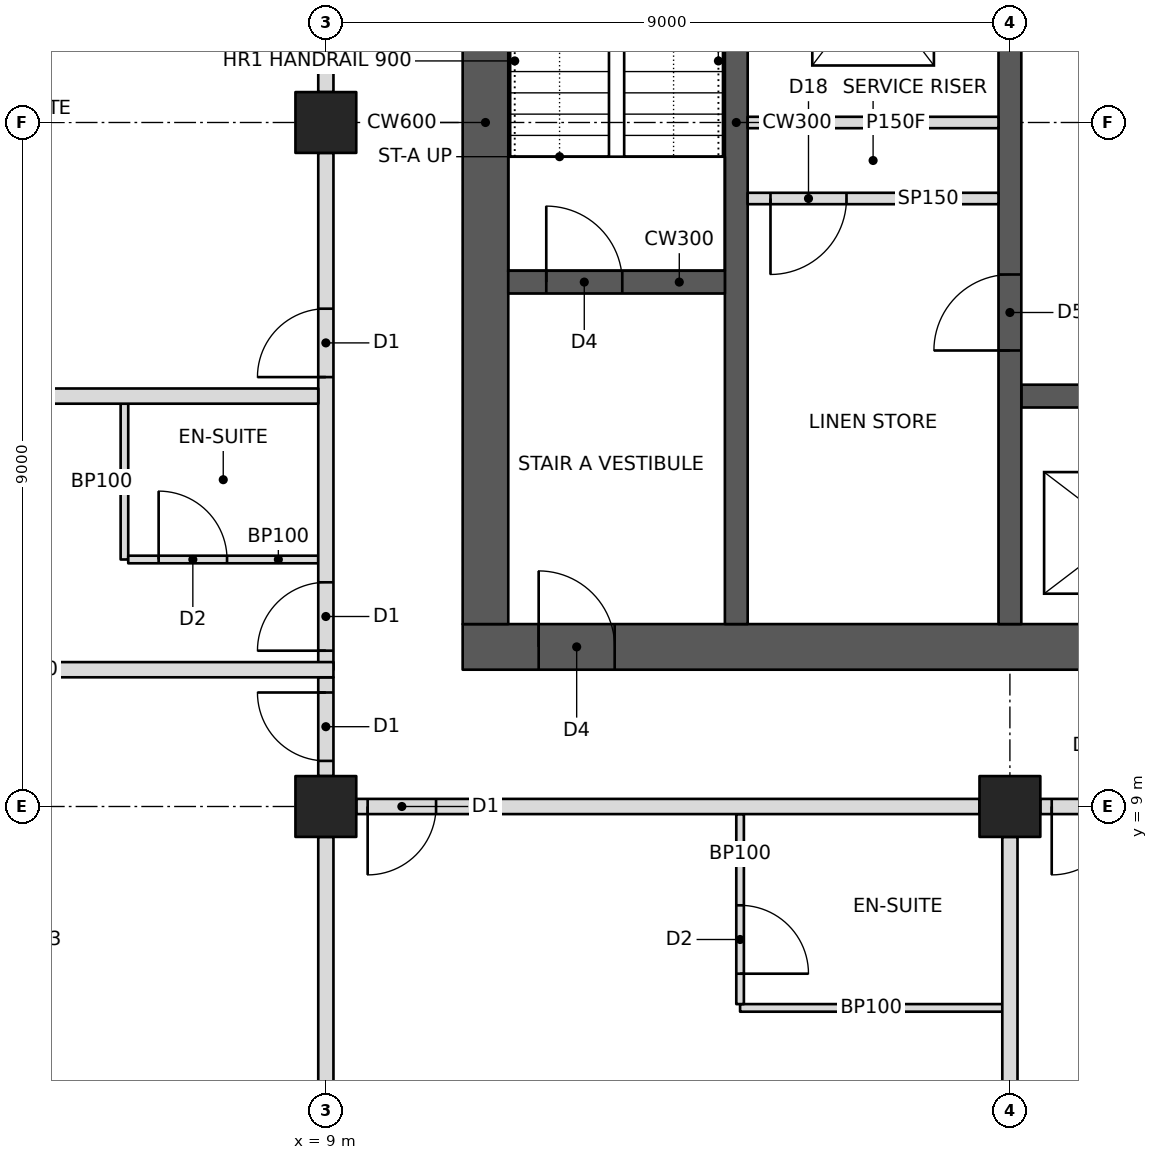
"""IFC4 building model, lengths in metres.
Left out: names, types, materials, properties, quantities, classifications, styles, units other than length and angle.
Written with IfcOpenShell. Run it as: python <this file> out.ifc"""

import sys

from ifc_helpers import new_model, si_unit, direction, frame, frame_2d, origin, origin_2d, place, context, subcontext, project, spatial, rectangle, hollow_rectangle, extrude, element, fill, save


model = new_model("IFC4")
c1 = context("Model", 3, precision=1e-05, world=origin(), true_north=direction((0.0, 1.0)))
c2 = subcontext(c1, "Body", "Model", "MODEL_VIEW")
j1 = project(units=[si_unit("LENGTHUNIT", "METRE"), si_unit("PLANEANGLEUNIT", "RADIAN")], contexts=[c1])
p1 = place(None, origin())
s1 = spatial("IfcSite", under=j1, at=p1, CompositionType="ELEMENT")
p2 = place(p1, origin())
s2 = spatial("IfcBuilding", under=s1, at=p2, CompositionType="ELEMENT")
p3 = place(p2, frame((0.0, 0.0, 177.4)))
s3 = spatial("IfcBuildingStorey", under=s2, at=p3, CompositionType="ELEMENT", Elevation=177.4)
for number, where, z_axis, x_axis in (
    (1, (9.0, 9.0, 0.0), (0.0, 0.0, 1.0), (1.0, 0.0, 0.0)),
    (2, (9.0, 18.0, 0.0), (0.0, 0.0, 1.0), (1.0, 0.0, 0.0)),
    (3, (18.0, 9.0, 0.0), (0.0, 0.0, 1.0), (1.0, 0.0, 0.0)),
):
    element("IfcColumn", number, at=place(p3, frame(where, z_axis=z_axis, x_axis=x_axis)), inside=s3, PredefinedType="COLUMN", context=c2, shape_type="SweptSolid", body=[
        extrude(hollow_rectangle(XDim=0.8, YDim=0.8, WallThickness=0.06, at=origin_2d()), origin(), (0.0, 0.0, 1.0), 3.4),
    ])
p4 = place(p3, frame((10.8, 11.1, 0.0), z_axis=(0.0, 0.0, 1.0), x_axis=(1.0, 0.0, 0.0)))
e4 = element("IfcWall", 4, at=p4, inside=s3, PredefinedType="SHEAR", context=c2, shape_type="SweptSolid", body=[
    extrude(rectangle(XDim=23.4, YDim=0.6, at=frame_2d((11.7, 0.0))), origin(), (0.0, 0.0, 1.0), 3.4),
])
p5 = place(p4, frame((1.0, 0.0, 0.0)))
e5 = element("IfcOpeningElement", 5, at=p5, cuts=e4, PredefinedType="OPENING", context=c2, shape_type="SweptSolid", body=[
    extrude(rectangle(XDim=1.0, YDim=2.1, at=frame_2d((0.5, 1.05))), frame((0.0, 0.31, 0.0), z_axis=(0.0, -1.0, 0.0), x_axis=(1.0, 0.0, 0.0)), (0.0, 0.0, 1.0), 0.62),
])
p6 = place(p4, frame((17.2, 0.0, 0.0)))
e6 = element("IfcOpeningElement", 6, at=p6, cuts=e4, PredefinedType="OPENING", context=c2, shape_type="SweptSolid", body=[
    extrude(rectangle(XDim=1.8, YDim=2.1, at=frame_2d((0.9, 1.05))), frame((0.0, 0.31, 0.0), z_axis=(0.0, -1.0, 0.0), x_axis=(1.0, 0.0, 0.0)), (0.0, 0.0, 1.0), 0.62),
])
p7 = place(p3, frame((11.1, 11.4, 0.0), z_axis=(0.0, 0.0, 1.0), x_axis=(0.0, 1.0, 0.0)))
e7 = element("IfcWall", 7, at=p7, inside=s3, PredefinedType="SHEAR", context=c2, shape_type="SweptSolid", body=[
    extrude(rectangle(XDim=13.2, YDim=0.6, at=frame_2d((6.6, 0.0))), origin(), (0.0, 0.0, 1.0), 3.4),
])
p8 = place(p3, frame((14.4, 11.4, 0.0), z_axis=(0.0, 0.0, 1.0), x_axis=(0.0, 1.0, 0.0)))
e8 = element("IfcWall", 8, at=p8, inside=s3, PredefinedType="SHEAR", context=c2, shape_type="SweptSolid", body=[
    extrude(rectangle(XDim=13.2, YDim=0.3, at=frame_2d((6.6, 0.0))), origin(), (0.0, 0.0, 1.0), 3.4),
])
p9 = place(p3, frame((11.4, 15.9, 0.0), z_axis=(0.0, 0.0, 1.0), x_axis=(1.0, 0.0, 0.0)))
e9 = element("IfcWall", 9, at=p9, inside=s3, PredefinedType="SHEAR", context=c2, shape_type="SweptSolid", body=[
    extrude(rectangle(XDim=2.85, YDim=0.3, at=frame_2d((1.425, 0.0))), origin(), (0.0, 0.0, 1.0), 3.4),
])
p10 = place(p9, frame((0.5, 0.0, 0.0)))
e10 = element("IfcOpeningElement", 10, at=p10, cuts=e9, PredefinedType="OPENING", context=c2, shape_type="SweptSolid", body=[
    extrude(rectangle(XDim=1.0, YDim=2.1, at=frame_2d((0.5, 1.05))), frame((0.0, 0.16, 0.0), z_axis=(0.0, -1.0, 0.0), x_axis=(1.0, 0.0, 0.0)), (0.0, 0.0, 1.0), 0.32),
])
p11 = place(p3, frame((18.0, 11.4, 0.0), z_axis=(0.0, 0.0, 1.0), x_axis=(0.0, 1.0, 0.0)))
e11 = element("IfcWall", 11, at=p11, inside=s3, PredefinedType="SHEAR", context=c2, shape_type="SweptSolid", body=[
    extrude(rectangle(XDim=13.2, YDim=0.3, at=frame_2d((6.6, 0.0))), origin(), (0.0, 0.0, 1.0), 3.4),
])
p12 = place(p11, frame((3.6, 0.0, 0.0)))
e12 = element("IfcOpeningElement", 12, at=p12, cuts=e11, PredefinedType="OPENING", context=c2, shape_type="SweptSolid", body=[
    extrude(rectangle(XDim=1.0, YDim=2.1, at=frame_2d((0.5, 1.05))), frame((0.0, 0.16, 0.0), z_axis=(0.0, -1.0, 0.0), x_axis=(1.0, 0.0, 0.0)), (0.0, 0.0, 1.0), 0.32),
])
p13 = place(p11, frame((7.85, 0.0, 0.0)))
e13 = element("IfcOpeningElement", 13, at=p13, cuts=e11, PredefinedType="OPENING", context=c2, shape_type="SweptSolid", body=[
    extrude(rectangle(XDim=1.1, YDim=2.1, at=frame_2d((0.55, 1.05))), frame((0.0, 0.16, 0.0), z_axis=(0.0, -1.0, 0.0), x_axis=(1.0, 0.0, 0.0)), (0.0, 0.0, 1.0), 0.32),
])
p14 = place(p3, frame((14.55, 18.0, 0.0), z_axis=(0.0, 0.0, 1.0), x_axis=(1.0, 0.0, 0.0)))
e14 = element("IfcWall", 14, at=p14, inside=s3, PredefinedType="PARTITIONING", context=c2, shape_type="SweptSolid", body=[
    extrude(rectangle(XDim=3.3, YDim=0.15, at=frame_2d((1.65, 0.0))), origin(), (0.0, 0.0, 1.0), 3.2),
])
p15 = place(p3, frame((18.15, 14.4, 0.0), z_axis=(0.0, 0.0, 1.0), x_axis=(1.0, 0.0, 0.0)))
e15 = element("IfcWall", 15, at=p15, inside=s3, PredefinedType="SHEAR", context=c2, shape_type="SweptSolid", body=[
    extrude(rectangle(XDim=9.0, YDim=0.3, at=frame_2d((4.5, 0.0))), origin(), (0.0, 0.0, 1.0), 3.4),
])
p16 = place(p15, frame((0.8, 0.0, 0.0)))
e16 = element("IfcOpeningElement", 16, at=p16, cuts=e15, PredefinedType="OPENING", context=c2, shape_type="SweptSolid", body=[
    extrude(rectangle(XDim=1.1, YDim=2.1, at=frame_2d((0.55, 1.05))), frame((0.0, 0.16, 0.0), z_axis=(0.0, -1.0, 0.0), x_axis=(1.0, 0.0, 0.0)), (0.0, 0.0, 1.0), 0.32),
])
p17 = place(p15, frame((6.75, 0.0, 0.0)))
e17 = element("IfcOpeningElement", 17, at=p17, cuts=e15, PredefinedType="OPENING", context=c2, shape_type="SweptSolid", body=[
    extrude(rectangle(XDim=1.2, YDim=2.1, at=frame_2d((0.6, 1.05))), frame((0.0, 0.16, 0.0), z_axis=(0.0, -1.0, 0.0), x_axis=(1.0, 0.0, 0.0)), (0.0, 0.0, 1.0), 0.32),
])
p18 = place(p15, frame((3.8, 0.0, 0.0)))
e18 = element("IfcOpeningElement", 18, at=p18, cuts=e15, PredefinedType="OPENING", context=c2, shape_type="SweptSolid", body=[
    extrude(rectangle(XDim=1.1, YDim=2.1, at=frame_2d((0.55, 1.05))), frame((0.0, 0.16, 0.0), z_axis=(0.0, -1.0, 0.0), x_axis=(1.0, 0.0, 0.0)), (0.0, 0.0, 1.0), 0.32),
])
p19 = place(p3, frame((9.4, 9.0, 0.0), z_axis=(0.0, 0.0, 1.0), x_axis=(1.0, 0.0, 0.0)))
e19 = element("IfcWall", 19, at=p19, inside=s3, PredefinedType="PARTITIONING", context=c2, shape_type="SweptSolid", body=[
    extrude(rectangle(XDim=8.2, YDim=0.2, at=frame_2d((4.1, 0.0))), origin(), (0.0, 0.0, 1.0), 2.405),
])
p20 = place(p19, frame((0.15, 0.0, 0.0)))
e20 = element("IfcOpeningElement", 20, at=p20, cuts=e19, PredefinedType="OPENING", context=c2, shape_type="SweptSolid", body=[
    extrude(rectangle(XDim=0.9, YDim=2.1, at=frame_2d((0.45, 1.05))), frame((0.0, 0.11, 0.0), z_axis=(0.0, -1.0, 0.0), x_axis=(1.0, 0.0, 0.0)), (0.0, 0.0, 1.0), 0.22),
])
p21 = place(p3, frame((18.4, 9.0, 0.0), z_axis=(0.0, 0.0, 1.0), x_axis=(1.0, 0.0, 0.0)))
e21 = element("IfcWall", 21, at=p21, inside=s3, PredefinedType="PARTITIONING", context=c2, shape_type="SweptSolid", body=[
    extrude(rectangle(XDim=8.2, YDim=0.2, at=frame_2d((4.1, 0.0))), origin(), (0.0, 0.0, 1.0), 2.405),
])
p22 = place(p21, frame((0.15, 0.0, 0.0)))
e22 = element("IfcOpeningElement", 22, at=p22, cuts=e21, PredefinedType="OPENING", context=c2, shape_type="SweptSolid", body=[
    extrude(rectangle(XDim=0.9, YDim=2.1, at=frame_2d((0.45, 1.05))), frame((0.0, 0.11, 0.0), z_axis=(0.0, -1.0, 0.0), x_axis=(1.0, 0.0, 0.0)), (0.0, 0.0, 1.0), 0.22),
])
p23 = place(p3, frame((9.0, 10.8, 0.0), z_axis=(0.0, 0.0, 1.0), x_axis=(0.0, 1.0, 0.0)))
e23 = element("IfcWall", 23, at=p23, inside=s3, PredefinedType="PARTITIONING", context=c2, shape_type="SweptSolid", body=[
    extrude(rectangle(XDim=6.8, YDim=0.2, at=frame_2d((3.4, 0.0))), origin(), (0.0, 0.0, 1.0), 2.405),
])
p24 = place(p23, frame((0.25, 0.0, 0.0)))
e24 = element("IfcOpeningElement", 24, at=p24, cuts=e23, PredefinedType="OPENING", context=c2, shape_type="SweptSolid", body=[
    extrude(rectangle(XDim=0.9, YDim=2.1, at=frame_2d((0.45, 1.05))), frame((0.0, 0.11, 0.0), z_axis=(0.0, -1.0, 0.0), x_axis=(1.0, 0.0, 0.0)), (0.0, 0.0, 1.0), 0.22),
])
p25 = place(p23, frame((3.85, 0.0, 0.0)))
e25 = element("IfcOpeningElement", 25, at=p25, cuts=e23, PredefinedType="OPENING", context=c2, shape_type="SweptSolid", body=[
    extrude(rectangle(XDim=0.9, YDim=2.1, at=frame_2d((0.45, 1.05))), frame((0.0, 0.11, 0.0), z_axis=(0.0, -1.0, 0.0), x_axis=(1.0, 0.0, 0.0)), (0.0, 0.0, 1.0), 0.22),
])
p26 = place(p3, frame((9.0, 18.4, 0.0), z_axis=(0.0, 0.0, 1.0), x_axis=(0.0, 1.0, 0.0)))
e26 = element("IfcWall", 26, at=p26, inside=s3, PredefinedType="PARTITIONING", context=c2, shape_type="SweptSolid", body=[
    extrude(rectangle(XDim=6.8, YDim=0.2, at=frame_2d((3.4, 0.0))), origin(), (0.0, 0.0, 1.0), 2.405),
])
p27 = place(p3, frame((1.0, 10.8, 0.0), z_axis=(0.0, 0.0, 1.0), x_axis=(1.0, 0.0, 0.0)))
e27 = element("IfcWall", 27, at=p27, inside=s3, PredefinedType="PARTITIONING", context=c2, shape_type="SweptSolid", body=[
    extrude(rectangle(XDim=8.1, YDim=0.2, at=frame_2d((4.05, 0.0))), origin(), (0.0, 0.0, 1.0), 2.404),
])
p28 = place(p3, frame((9.0, 8.6, 0.0), z_axis=(0.0, 0.0, 1.0), x_axis=(0.0, -1.0, 0.0)))
e28 = element("IfcWall", 28, at=p28, inside=s3, PredefinedType="PARTITIONING", context=c2, shape_type="SweptSolid", body=[
    extrude(rectangle(XDim=7.6, YDim=0.2, at=frame_2d((3.8, 0.0))), origin(), (0.0, 0.0, 1.0), 2.438),
])
p29 = place(p3, frame((18.0, 8.6, 0.0), z_axis=(0.0, 0.0, 1.0), x_axis=(0.0, -1.0, 0.0)))
e29 = element("IfcWall", 29, at=p29, inside=s3, PredefinedType="PARTITIONING", context=c2, shape_type="SweptSolid", body=[
    extrude(rectangle(XDim=7.6, YDim=0.2, at=frame_2d((3.8, 0.0))), origin(), (0.0, 0.0, 1.0), 2.405),
])
p30 = place(p3, frame((14.45, 6.35, 0.0), z_axis=(0.0, 0.0, 1.0), x_axis=(1.0, 0.0, 0.0)))
e30 = element("IfcWall", 30, at=p30, inside=s3, PredefinedType="PARTITIONING", context=c2, shape_type="SweptSolid", body=[
    extrude(rectangle(XDim=3.45, YDim=0.1, at=frame_2d((1.725, 0.0))), origin(), (0.0, 0.0, 1.0), 2.404),
])
p31 = place(p3, frame((14.45, 8.9, 0.0), z_axis=(0.0, 0.0, 1.0), x_axis=(0.0, -1.0, 0.0)))
e31 = element("IfcWall", 31, at=p31, inside=s3, PredefinedType="PARTITIONING", context=c2, shape_type="SweptSolid", body=[
    extrude(rectangle(XDim=2.5, YDim=0.1, at=frame_2d((1.25, 0.0))), origin(), (0.0, 0.0, 1.0), 2.404),
])
p32 = place(p31, frame((1.2, 0.0, 0.0)))
e32 = element("IfcOpeningElement", 32, at=p32, cuts=e31, PredefinedType="OPENING", context=c2, shape_type="SweptSolid", body=[
    extrude(rectangle(XDim=0.9, YDim=2.1, at=frame_2d((0.45, 1.05))), frame((0.0, 0.06, 0.0), z_axis=(0.0, -1.0, 0.0), x_axis=(1.0, 0.0, 0.0)), (0.0, 0.0, 1.0), 0.12),
])
p33 = place(p3, frame((8.9, 14.4, 0.0), z_axis=(0.0, 0.0, 1.0), x_axis=(-1.0, 0.0, 0.0)))
e33 = element("IfcWall", 33, at=p33, inside=s3, PredefinedType="PARTITIONING", context=c2, shape_type="SweptSolid", body=[
    extrude(rectangle(XDim=7.9, YDim=0.2, at=frame_2d((3.95, 0.0))), origin(), (0.0, 0.0, 1.0), 2.404),
])
p34 = place(p3, frame((6.35, 12.25, 0.0), z_axis=(0.0, 0.0, 1.0), x_axis=(0.0, 1.0, 0.0)))
e34 = element("IfcWall", 34, at=p34, inside=s3, PredefinedType="PARTITIONING", context=c2, shape_type="SweptSolid", body=[
    extrude(rectangle(XDim=2.05, YDim=0.1, at=frame_2d((1.025, 0.0))), origin(), (0.0, 0.0, 1.0), 3.2),
])
p35 = place(p3, frame((8.9, 12.25, 0.0), z_axis=(0.0, 0.0, 1.0), x_axis=(-1.0, 0.0, 0.0)))
e35 = element("IfcWall", 35, at=p35, inside=s3, PredefinedType="PARTITIONING", context=c2, shape_type="SweptSolid", body=[
    extrude(rectangle(XDim=2.5, YDim=0.1, at=frame_2d((1.25, 0.0))), origin(), (0.0, 0.0, 1.0), 2.404),
])
p36 = place(p35, frame((1.2, 0.0, 0.0)))
e36 = element("IfcOpeningElement", 36, at=p36, cuts=e35, PredefinedType="OPENING", context=c2, shape_type="SweptSolid", body=[
    extrude(rectangle(XDim=0.9, YDim=2.1, at=frame_2d((0.45, 1.05))), frame((0.0, 0.06, 0.0), z_axis=(0.0, -1.0, 0.0), x_axis=(1.0, 0.0, 0.0)), (0.0, 0.0, 1.0), 0.12),
])
p37 = place(p3, frame((9.0, 9.4, 0.0), z_axis=(0.0, 0.0, 1.0), x_axis=(0.0, 1.0, 0.0)))
e37 = element("IfcWall", 37, at=p37, inside=s3, PredefinedType="PARTITIONING", context=c2, shape_type="SweptSolid", body=[
    extrude(rectangle(XDim=1.3, YDim=0.2, at=frame_2d((0.65, 0.0))), origin(), (0.0, 0.0, 1.0), 2.405),
])
p38 = place(p37, frame((0.2, 0.0, 0.0)))
e38 = element("IfcOpeningElement", 38, at=p38, cuts=e37, PredefinedType="OPENING", context=c2, shape_type="SweptSolid", body=[
    extrude(rectangle(XDim=0.9, YDim=2.1, at=frame_2d((0.45, 1.05))), frame((0.0, 0.11, 0.0), z_axis=(0.0, -1.0, 0.0), x_axis=(1.0, 0.0, 0.0)), (0.0, 0.0, 1.0), 0.22),
])
p39 = place(p3, frame((14.55, 17.0, 0.0), z_axis=(0.0, 0.0, 1.0), x_axis=(1.0, 0.0, 0.0)))
e39 = element("IfcWall", 39, at=p39, inside=s3, PredefinedType="PARTITIONING", context=c2, shape_type="SweptSolid", body=[
    extrude(rectangle(XDim=3.3, YDim=0.15, at=frame_2d((1.65, 0.0))), origin(), (0.0, 0.0, 1.0), 3.2),
])
p40 = place(p39, frame((0.3, 0.0, 0.0)))
e40 = element("IfcOpeningElement", 40, at=p40, cuts=e39, PredefinedType="OPENING", context=c2, shape_type="SweptSolid", body=[
    extrude(rectangle(XDim=1.0, YDim=2.1, at=frame_2d((0.5, 1.05))), frame((0.0, 0.085, 0.0), z_axis=(0.0, -1.0, 0.0), x_axis=(1.0, 0.0, 0.0)), (0.0, 0.0, 1.0), 0.17),
])
p41 = place(p32, origin())
e41 = element("IfcDoor", 41, at=p41, inside=s3, OperationType="SINGLE_SWING_RIGHT", PredefinedType="DOOR", context=c2, shape_type="SweptSolid", body=[
    extrude(rectangle(XDim=0.9, YDim=2.1, at=frame_2d((0.45, 1.05))), frame((0.0, 0.025, 0.0), z_axis=(0.0, -1.0, 0.0), x_axis=(1.0, 0.0, 0.0)), (0.0, 0.0, 1.0), 0.05),
])
fill(e32, e41)
p42 = place(p20, frame((0.9, 0.0, 0.0), z_axis=(0.0, 0.0, 1.0), x_axis=(-1.0, 0.0, 0.0)))
e42 = element("IfcDoor", 42, at=p42, inside=s3, OperationType="SINGLE_SWING_RIGHT", PredefinedType="DOOR", context=c2, shape_type="SweptSolid", body=[
    extrude(rectangle(XDim=0.9, YDim=2.1, at=frame_2d((0.45, 1.05))), frame((0.0, 0.025, 0.0), z_axis=(0.0, -1.0, 0.0), x_axis=(1.0, 0.0, 0.0)), (0.0, 0.0, 1.0), 0.05),
])
fill(e20, e42)
p43 = place(p22, frame((0.9, 0.0, 0.0), z_axis=(0.0, 0.0, 1.0), x_axis=(-1.0, 0.0, 0.0)))
e43 = element("IfcDoor", 43, at=p43, inside=s3, OperationType="SINGLE_SWING_RIGHT", PredefinedType="DOOR", context=c2, shape_type="SweptSolid", body=[
    extrude(rectangle(XDim=0.9, YDim=2.1, at=frame_2d((0.45, 1.05))), frame((0.0, 0.025, 0.0), z_axis=(0.0, -1.0, 0.0), x_axis=(1.0, 0.0, 0.0)), (0.0, 0.0, 1.0), 0.05),
])
fill(e22, e43)
p44 = place(p36, frame((0.9, 0.0, 0.0), z_axis=(0.0, 0.0, 1.0), x_axis=(-1.0, 0.0, 0.0)))
e44 = element("IfcDoor", 44, at=p44, inside=s3, OperationType="SINGLE_SWING_LEFT", PredefinedType="DOOR", context=c2, shape_type="SweptSolid", body=[
    extrude(rectangle(XDim=0.9, YDim=2.1, at=frame_2d((0.45, 1.05))), frame((0.0, 0.025, 0.0), z_axis=(0.0, -1.0, 0.0), x_axis=(1.0, 0.0, 0.0)), (0.0, 0.0, 1.0), 0.05),
])
fill(e36, e44)
p45 = place(p24, origin())
e45 = element("IfcDoor", 45, at=p45, inside=s3, OperationType="SINGLE_SWING_LEFT", PredefinedType="DOOR", context=c2, shape_type="SweptSolid", body=[
    extrude(rectangle(XDim=0.9, YDim=2.1, at=frame_2d((0.45, 1.05))), frame((0.0, 0.025, 0.0), z_axis=(0.0, -1.0, 0.0), x_axis=(1.0, 0.0, 0.0)), (0.0, 0.0, 1.0), 0.05),
])
fill(e24, e45)
p46 = place(p25, origin())
e46 = element("IfcDoor", 46, at=p46, inside=s3, OperationType="SINGLE_SWING_LEFT", PredefinedType="DOOR", context=c2, shape_type="SweptSolid", body=[
    extrude(rectangle(XDim=0.9, YDim=2.1, at=frame_2d((0.45, 1.05))), frame((0.0, 0.025, 0.0), z_axis=(0.0, -1.0, 0.0), x_axis=(1.0, 0.0, 0.0)), (0.0, 0.0, 1.0), 0.05),
])
fill(e25, e46)
p47 = place(p38, origin())
e47 = element("IfcDoor", 47, at=p47, inside=s3, OperationType="SINGLE_SWING_RIGHT", PredefinedType="DOOR", context=c2, shape_type="SweptSolid", body=[
    extrude(rectangle(XDim=0.9, YDim=2.1, at=frame_2d((0.45, 1.05))), frame((0.0, 0.025, 0.0), z_axis=(0.0, -1.0, 0.0), x_axis=(1.0, 0.0, 0.0)), (0.0, 0.0, 1.0), 0.05),
])
fill(e38, e47)
p48 = place(p40, frame((1.0, 0.0, 0.0), z_axis=(0.0, 0.0, 1.0), x_axis=(-1.0, 0.0, 0.0)))
e48 = element("IfcDoor", 48, at=p48, inside=s3, OperationType="SINGLE_SWING_RIGHT", PredefinedType="DOOR", context=c2, shape_type="SweptSolid", body=[
    extrude(rectangle(XDim=1.0, YDim=2.1, at=frame_2d((0.5, 1.05))), frame((0.0, 0.025, 0.0), z_axis=(0.0, -1.0, 0.0), x_axis=(1.0, 0.0, 0.0)), (0.0, 0.0, 1.0), 0.05),
])
fill(e40, e48)
p49 = place(p5, origin())
e49 = element("IfcDoor", 49, at=p49, inside=s3, OperationType="SINGLE_SWING_LEFT", PredefinedType="DOOR", context=c2, shape_type="SweptSolid", body=[
    extrude(rectangle(XDim=1.0, YDim=2.1, at=frame_2d((0.5, 1.05))), frame((0.0, 0.025, 0.0), z_axis=(0.0, -1.0, 0.0), x_axis=(1.0, 0.0, 0.0)), (0.0, 0.0, 1.0), 0.05),
])
fill(e5, e49)
p50 = place(p10, origin())
e50 = element("IfcDoor", 50, at=p50, inside=s3, OperationType="SINGLE_SWING_LEFT", PredefinedType="DOOR", context=c2, shape_type="SweptSolid", body=[
    extrude(rectangle(XDim=1.0, YDim=2.1, at=frame_2d((0.5, 1.05))), frame((0.0, 0.025, 0.0), z_axis=(0.0, -1.0, 0.0), x_axis=(1.0, 0.0, 0.0)), (0.0, 0.0, 1.0), 0.05),
])
fill(e10, e50)
p51 = place(p12, origin())
e51 = element("IfcDoor", 51, at=p51, inside=s3, OperationType="SINGLE_SWING_LEFT", PredefinedType="DOOR", context=c2, shape_type="SweptSolid", body=[
    extrude(rectangle(XDim=1.0, YDim=2.1, at=frame_2d((0.5, 1.05))), frame((0.0, 0.025, 0.0), z_axis=(0.0, -1.0, 0.0), x_axis=(1.0, 0.0, 0.0)), (0.0, 0.0, 1.0), 0.05),
])
fill(e12, e51)
save(model, sys.argv[1])
